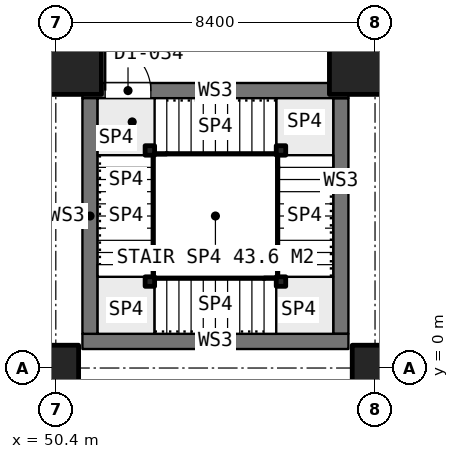
"""IFC4 building model, lengths in metres.
Left out: names, types, materials, properties, quantities, classifications, styles, units other than length and angle.
Written with IfcOpenShell. Run it as: python <this file> out.ifc"""

import sys

from ifc_helpers import new_model, si_unit, direction, frame, frame_2d, origin, origin_2d, place, context, subcontext, project, spatial, rectangle, extrude, element, fill, save


model = new_model("IFC4")
c1 = context("Model", 3, precision=1e-05, world=origin(), true_north=direction((0.0, 1.0)))
c2 = subcontext(c1, "Body", "Model", "MODEL_VIEW")
j1 = project(units=[si_unit("LENGTHUNIT", "METRE"), si_unit("PLANEANGLEUNIT", "RADIAN")], contexts=[c1])
p1 = place(None, origin())
s1 = spatial("IfcSite", under=j1, at=p1, CompositionType="ELEMENT")
p2 = place(p1, origin())
s2 = spatial("IfcBuilding", under=s1, at=p2, CompositionType="ELEMENT")
p3 = place(p2, frame((0.0, 0.0, 10.4)))
s3 = spatial("IfcBuildingStorey", under=s2, at=p3, CompositionType="ELEMENT", Elevation=10.4)
p4 = place(p3, frame((50.4, 0.0, 0.0), z_axis=(0.0, 0.0, 1.0), x_axis=(1.0, 0.0, 0.0)))
e1 = element("IfcColumn", 1, at=p4, inside=s3, PredefinedType="COLUMN", context=c2, shape_type="SweptSolid", body=[
    extrude(rectangle(XDim=1.2, YDim=1.2, at=origin_2d()), origin(), (0.0, 0.0, 1.0), 5.0),
])
p5 = place(p3, frame((50.4, 8.4, 0.0), z_axis=(0.0, 0.0, 1.0), x_axis=(1.0, 0.0, 0.0)))
e2 = element("IfcColumn", 2, at=p5, inside=s3, PredefinedType="COLUMN", context=c2, shape_type="SweptSolid", body=[
    extrude(rectangle(XDim=2.4, YDim=2.4, at=origin_2d()), origin(), (0.0, 0.0, 1.0), 5.0),
])
p6 = place(p3, frame((58.8, 0.0, 0.0), z_axis=(0.0, 0.0, 1.0), x_axis=(1.0, 0.0, 0.0)))
e3 = element("IfcColumn", 3, at=p6, inside=s3, PredefinedType="COLUMN", context=c2, shape_type="SweptSolid", body=[
    extrude(rectangle(XDim=1.2, YDim=1.2, at=origin_2d()), origin(), (0.0, 0.0, 1.0), 5.0),
])
p7 = place(p3, frame((58.8, 8.4, 0.0), z_axis=(0.0, 0.0, 1.0), x_axis=(1.0, 0.0, 0.0)))
e4 = element("IfcColumn", 4, at=p7, inside=s3, PredefinedType="COLUMN", context=c2, shape_type="SweptSolid", body=[
    extrude(rectangle(XDim=2.4, YDim=2.4, at=origin_2d()), origin(), (0.0, 0.0, 1.0), 5.0),
])
p8 = place(p3, frame((51.1, 0.7, 0.0), z_axis=(0.0, 0.0, 1.0), x_axis=(1.0, 0.0, 0.0)))
e5 = element("IfcWall", 5, at=p8, inside=s3, PredefinedType="SOLIDWALL", context=c2, shape_type="SweptSolid", body=[
    extrude(rectangle(XDim=7.0, YDim=0.4, at=frame_2d((3.5, 0.0))), origin(), (0.0, 0.0, 1.0), 4.7),
])
p9 = place(p3, frame((51.1, 7.3, 0.0), z_axis=(0.0, 0.0, 1.0), x_axis=(1.0, 0.0, 0.0)))
e6 = element("IfcWall", 6, at=p9, inside=s3, PredefinedType="SOLIDWALL", context=c2, shape_type="SweptSolid", body=[
    extrude(rectangle(XDim=7.0, YDim=0.4, at=frame_2d((3.5, 0.0))), origin(), (0.0, 0.0, 1.0), 4.7),
])
p10 = place(p9, frame((0.6, 0.0, 0.0)))
e7 = element("IfcOpeningElement", 7, at=p10, cuts=e6, PredefinedType="OPENING", context=c2, shape_type="SweptSolid", body=[
    extrude(rectangle(XDim=1.2, YDim=2.1, at=frame_2d((0.6, 1.05))), frame((0.0, 0.21, 0.0), z_axis=(0.0, -1.0, 0.0), x_axis=(1.0, 0.0, 0.0)), (0.0, 0.0, 1.0), 0.42),
])
for number, where, z_axis, x_axis in (
    (8, (51.3, 0.9, 0.0), (0.0, 0.0, 1.0), (0.0, 1.0, 0.0)),
    (9, (57.9, 0.9, 0.0), (0.0, 0.0, 1.0), (0.0, 1.0, 0.0)),
):
    element("IfcWall", number, at=place(p3, frame(where, z_axis=z_axis, x_axis=x_axis)), inside=s3, PredefinedType="SOLIDWALL", context=c2, shape_type="SweptSolid", body=[
        extrude(rectangle(XDim=6.2, YDim=0.4, at=frame_2d((3.1, 0.0))), origin(), (0.0, 0.0, 1.0), 4.7),
    ])
for number, where, z_axis, x_axis in (
    (10, (52.875, 5.725, 0.0), (0.0, 0.0, 1.0), (1.0, 0.0, 0.0)),
    (11, (52.875, 2.275, 0.0), (0.0, 0.0, 1.0), (1.0, 0.0, 0.0)),
    (12, (56.325, 2.275, 0.0), (0.0, 0.0, 1.0), (1.0, 0.0, 0.0)),
    (13, (56.325, 5.725, 0.0), (0.0, 0.0, 1.0), (1.0, 0.0, 0.0)),
):
    element("IfcColumn", number, at=place(p3, frame(where, z_axis=z_axis, x_axis=x_axis)), inside=s3, PredefinedType="COLUMN", context=c2, shape_type="SweptSolid", body=[
        extrude(rectangle(XDim=0.25, YDim=0.25, at=origin_2d()), origin(), (0.0, 0.0, 1.0), 5.0),
    ])
p11 = place(p10, origin())
e14 = element("IfcDoor", 14, at=p11, inside=s3, OperationType="SINGLE_SWING_RIGHT", PredefinedType="DOOR", context=c2, shape_type="SweptSolid", body=[
    extrude(rectangle(XDim=1.2, YDim=2.1, at=frame_2d((0.6, 1.05))), frame((0.0, 0.025, 0.0), z_axis=(0.0, -1.0, 0.0), x_axis=(1.0, 0.0, 0.0)), (0.0, 0.0, 1.0), 0.05),
])
fill(e7, e14)
save(model, sys.argv[1])
